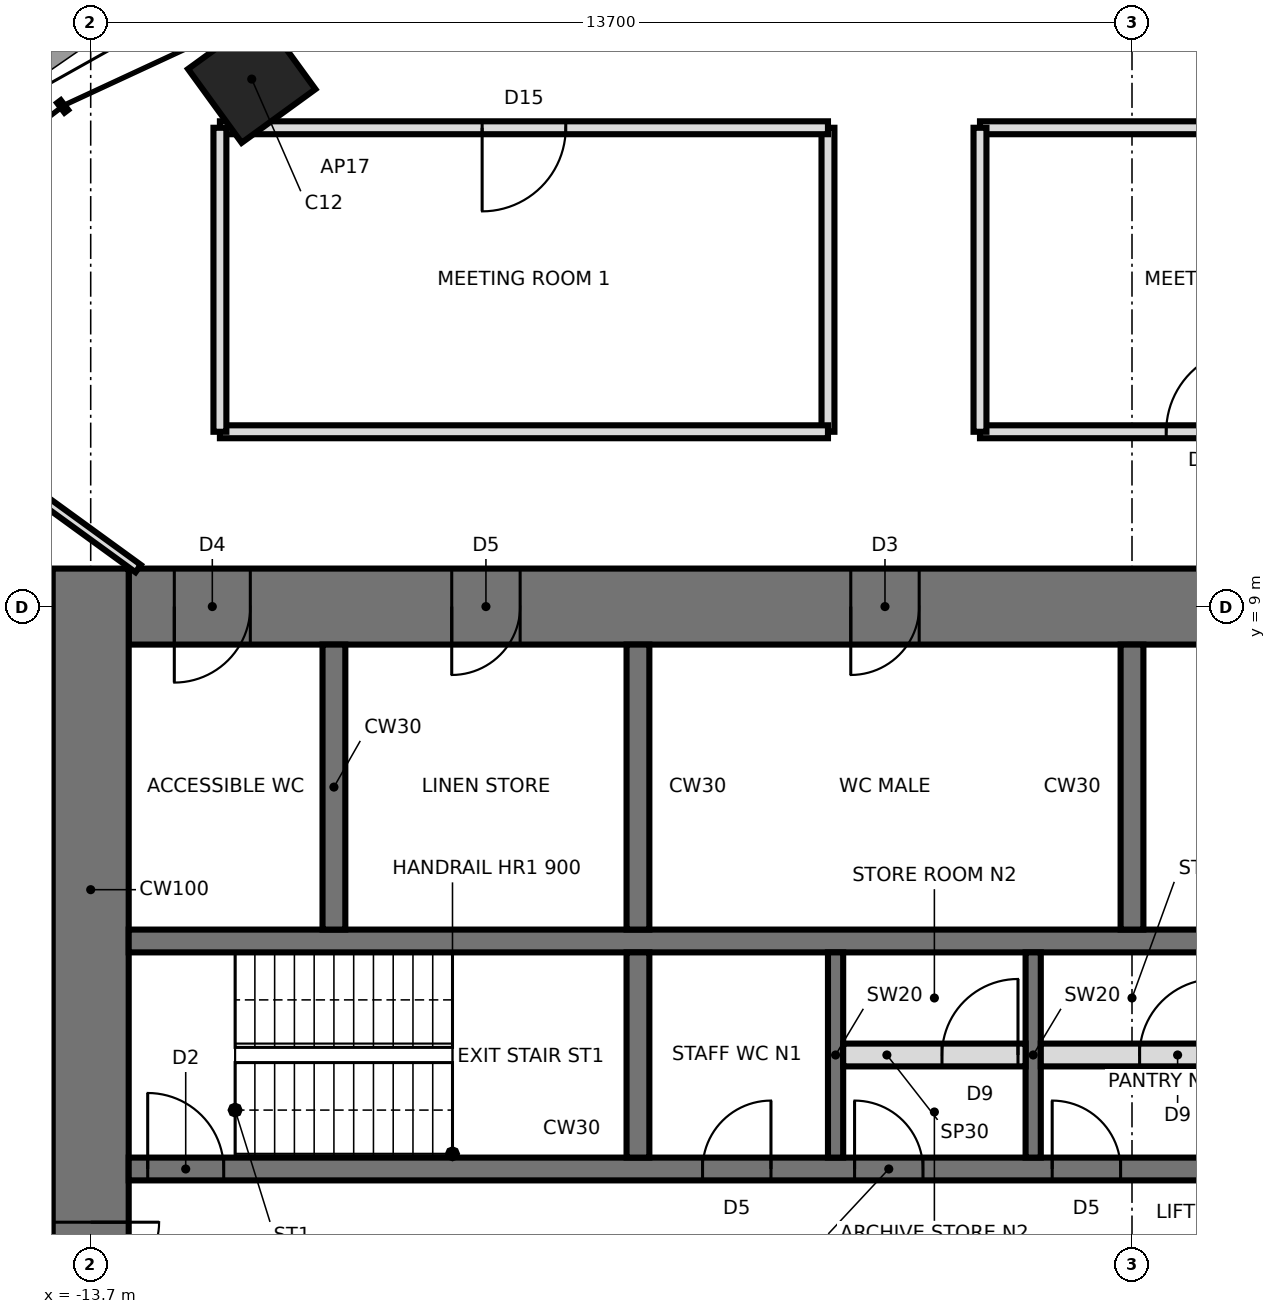
"""IFC4 building model, lengths in metres.
Left out: names, types, materials, properties, quantities, classifications, styles, units other than length and angle.
Written with IfcOpenShell. Run it as: python <this file> out.ifc"""

import sys

from ifc_helpers import new_model, si_unit, direction, frame, frame_2d, origin, origin_2d, place, context, subcontext, project, spatial, rectangle, extrude, element, fill, save


model = new_model("IFC4")
c1 = context("Model", 3, precision=1e-05, world=origin(), true_north=direction((0.0, 1.0)))
c2 = subcontext(c1, "Body", "Model", "MODEL_VIEW")
j1 = project(units=[si_unit("LENGTHUNIT", "METRE"), si_unit("PLANEANGLEUNIT", "RADIAN")], contexts=[c1])
p1 = place(None, origin())
s1 = spatial("IfcSite", under=j1, at=p1, CompositionType="ELEMENT")
p2 = place(p1, origin())
s2 = spatial("IfcBuilding", under=s1, at=p2, CompositionType="ELEMENT")
p3 = place(p2, frame((0.0, 0.0, 264.4)))
s3 = spatial("IfcBuildingStorey", under=s2, at=p3, CompositionType="ELEMENT", Elevation=264.4)
p4 = place(p3, frame((-11.581, 15.94, 0.0), z_axis=(0.0, 0.0, 1.0), x_axis=(-0.587785252292, 0.809016994375, 0.0)))
e1 = element("IfcColumn", 1, at=p4, inside=s3, PredefinedType="COLUMN", context=c2, shape_type="SweptSolid", body=[
    extrude(rectangle(XDim=1.2, YDim=1.2, at=origin_2d()), origin(), (0.0, 0.0, 1.0), 4.2),
])
p5 = place(p3, frame((13.2, 9.0, 0.0), z_axis=(0.0, 0.0, 1.0), x_axis=(-1.0, 0.0, 0.0)))
e2 = element("IfcWall", 2, at=p5, inside=s3, PredefinedType="SHEAR", context=c2, shape_type="SweptSolid", body=[
    extrude(rectangle(XDim=26.4, YDim=1.0, at=frame_2d((13.2, 0.0))), origin(), (0.0, 0.0, 1.0), 4.2),
])
p6 = place(p5, frame((2.65, 0.0, 0.0)))
e3 = element("IfcOpeningElement", 3, at=p6, cuts=e2, PredefinedType="OPENING", context=c2, shape_type="SweptSolid", body=[
    extrude(rectangle(XDim=0.9, YDim=2.1, at=frame_2d((0.45, 1.05))), frame((0.0, 0.51, 0.0), z_axis=(0.0, -1.0, 0.0), x_axis=(1.0, 0.0, 0.0)), (0.0, 0.0, 1.0), 1.02),
])
p7 = place(p5, frame((9.5, 0.0, 0.0)))
e4 = element("IfcOpeningElement", 4, at=p7, cuts=e2, PredefinedType="OPENING", context=c2, shape_type="SweptSolid", body=[
    extrude(rectangle(XDim=0.9, YDim=2.1, at=frame_2d((0.45, 1.05))), frame((0.0, 0.51, 0.0), z_axis=(0.0, -1.0, 0.0), x_axis=(1.0, 0.0, 0.0)), (0.0, 0.0, 1.0), 1.02),
])
p8 = place(p5, frame((16.0, 0.0, 0.0)))
e5 = element("IfcOpeningElement", 5, at=p8, cuts=e2, PredefinedType="OPENING", context=c2, shape_type="SweptSolid", body=[
    extrude(rectangle(XDim=0.9, YDim=2.1, at=frame_2d((0.45, 1.05))), frame((0.0, 0.51, 0.0), z_axis=(0.0, -1.0, 0.0), x_axis=(1.0, 0.0, 0.0)), (0.0, 0.0, 1.0), 1.02),
])
p9 = place(p5, frame((21.25, 0.0, 0.0)))
e6 = element("IfcOpeningElement", 6, at=p9, cuts=e2, PredefinedType="OPENING", context=c2, shape_type="SweptSolid", body=[
    extrude(rectangle(XDim=0.9, YDim=2.1, at=frame_2d((0.45, 1.05))), frame((0.0, 0.51, 0.0), z_axis=(0.0, -1.0, 0.0), x_axis=(1.0, 0.0, 0.0)), (0.0, 0.0, 1.0), 1.02),
])
p10 = place(p5, frame((24.8, 0.0, 0.0)))
e7 = element("IfcOpeningElement", 7, at=p10, cuts=e2, PredefinedType="OPENING", context=c2, shape_type="SweptSolid", body=[
    extrude(rectangle(XDim=1.0, YDim=2.1, at=frame_2d((0.5, 1.05))), frame((0.0, 0.51, 0.0), z_axis=(0.0, -1.0, 0.0), x_axis=(1.0, 0.0, 0.0)), (0.0, 0.0, 1.0), 1.02),
])
p11 = place(p3, frame((-13.7, 9.5, 0.0), z_axis=(0.0, 0.0, 1.0), x_axis=(0.0, -1.0, 0.0)))
e8 = element("IfcWall", 8, at=p11, inside=s3, PredefinedType="SHEAR", context=c2, shape_type="SweptSolid", body=[
    extrude(rectangle(XDim=19.0, YDim=1.0, at=frame_2d((9.5, 0.0))), origin(), (0.0, 0.0, 1.0), 4.2),
])
p12 = place(p11, frame((8.6, 0.0, 0.0)))
e9 = element("IfcOpeningElement", 9, at=p12, cuts=e8, PredefinedType="OPENING", context=c2, shape_type="SweptSolid", body=[
    extrude(rectangle(XDim=1.8, YDim=2.4, at=frame_2d((0.9, 1.2))), frame((0.0, 0.51, 0.0), z_axis=(0.0, -1.0, 0.0), x_axis=(1.0, 0.0, 0.0)), (0.0, 0.0, 1.0), 1.02),
])
p13 = place(p3, frame((-13.2, 1.6, 0.0), z_axis=(0.0, 0.0, 1.0), x_axis=(1.0, 0.0, 0.0)))
e10 = element("IfcWall", 10, at=p13, inside=s3, PredefinedType="SHEAR", context=c2, shape_type="SweptSolid", body=[
    extrude(rectangle(XDim=26.4, YDim=0.3, at=frame_2d((13.2, 0.0))), origin(), (0.0, 0.0, 1.0), 4.2),
])
p14 = place(p13, frame((0.25, 0.0, 0.0)))
e11 = element("IfcOpeningElement", 11, at=p14, cuts=e10, PredefinedType="OPENING", context=c2, shape_type="SweptSolid", body=[
    extrude(rectangle(XDim=1.0, YDim=2.1, at=frame_2d((0.5, 1.05))), frame((0.0, 0.16, 0.0), z_axis=(0.0, -1.0, 0.0), x_axis=(1.0, 0.0, 0.0)), (0.0, 0.0, 1.0), 0.32),
])
p15 = place(p13, frame((20.25, 0.0, 0.0)))
e12 = element("IfcOpeningElement", 12, at=p15, cuts=e10, PredefinedType="OPENING", context=c2, shape_type="SweptSolid", body=[
    extrude(rectangle(XDim=1.5, YDim=2.4, at=frame_2d((0.75, 1.2))), frame((0.0, 0.16, 0.0), z_axis=(0.0, -1.0, 0.0), x_axis=(1.0, 0.0, 0.0)), (0.0, 0.0, 1.0), 0.32),
])
p16 = place(p13, frame((7.55, 0.0, 0.0)))
e13 = element("IfcOpeningElement", 13, at=p16, cuts=e10, PredefinedType="OPENING", context=c2, shape_type="SweptSolid", body=[
    extrude(rectangle(XDim=0.9, YDim=2.1, at=frame_2d((0.45, 1.05))), frame((0.0, 0.16, 0.0), z_axis=(0.0, -1.0, 0.0), x_axis=(1.0, 0.0, 0.0)), (0.0, 0.0, 1.0), 0.32),
])
p17 = place(p13, frame((9.55, 0.0, 0.0)))
e14 = element("IfcOpeningElement", 14, at=p17, cuts=e10, PredefinedType="OPENING", context=c2, shape_type="SweptSolid", body=[
    extrude(rectangle(XDim=0.9, YDim=2.1, at=frame_2d((0.45, 1.05))), frame((0.0, 0.16, 0.0), z_axis=(0.0, -1.0, 0.0), x_axis=(1.0, 0.0, 0.0)), (0.0, 0.0, 1.0), 0.32),
])
p18 = place(p13, frame((12.15, 0.0, 0.0)))
e15 = element("IfcOpeningElement", 15, at=p18, cuts=e10, PredefinedType="OPENING", context=c2, shape_type="SweptSolid", body=[
    extrude(rectangle(XDim=0.9, YDim=2.1, at=frame_2d((0.45, 1.05))), frame((0.0, 0.16, 0.0), z_axis=(0.0, -1.0, 0.0), x_axis=(1.0, 0.0, 0.0)), (0.0, 0.0, 1.0), 0.32),
])
p19 = place(p13, frame((15.25, 0.0, 0.0)))
e16 = element("IfcOpeningElement", 16, at=p19, cuts=e10, PredefinedType="OPENING", context=c2, shape_type="SweptSolid", body=[
    extrude(rectangle(XDim=1.1, YDim=2.3, at=frame_2d((0.55, 1.15))), frame((0.0, 0.16, 0.0), z_axis=(0.0, -1.0, 0.0), x_axis=(1.0, 0.0, 0.0)), (0.0, 0.0, 1.0), 0.32),
])
p20 = place(p13, frame((17.85, 0.0, 0.0)))
e17 = element("IfcOpeningElement", 17, at=p20, cuts=e10, PredefinedType="OPENING", context=c2, shape_type="SweptSolid", body=[
    extrude(rectangle(XDim=1.1, YDim=2.3, at=frame_2d((0.55, 1.15))), frame((0.0, 0.16, 0.0), z_axis=(0.0, -1.0, 0.0), x_axis=(1.0, 0.0, 0.0)), (0.0, 0.0, 1.0), 0.32),
])
p21 = place(p13, frame((24.15, 0.0, 0.0)))
e18 = element("IfcOpeningElement", 18, at=p21, cuts=e10, PredefinedType="OPENING", context=c2, shape_type="SweptSolid", body=[
    extrude(rectangle(XDim=0.9, YDim=2.1, at=frame_2d((0.45, 1.05))), frame((0.0, 0.16, 0.0), z_axis=(0.0, -1.0, 0.0), x_axis=(1.0, 0.0, 0.0)), (0.0, 0.0, 1.0), 0.32),
])
p22 = place(p3, frame((-13.2, 4.6, 0.0), z_axis=(0.0, 0.0, 1.0), x_axis=(1.0, 0.0, 0.0)))
e19 = element("IfcWall", 19, at=p22, inside=s3, PredefinedType="SHEAR", context=c2, shape_type="SweptSolid", body=[
    extrude(rectangle(XDim=26.4, YDim=0.3, at=frame_2d((13.2, 0.0))), origin(), (0.0, 0.0, 1.0), 4.2),
])
p23 = place(p3, frame((-6.5, 1.75, 0.0), z_axis=(0.0, 0.0, 1.0), x_axis=(0.0, 1.0, 0.0)))
e20 = element("IfcWall", 20, at=p23, inside=s3, PredefinedType="SHEAR", context=c2, shape_type="SweptSolid", body=[
    extrude(rectangle(XDim=2.7, YDim=0.3, at=frame_2d((1.35, 0.0))), origin(), (0.0, 0.0, 1.0), 4.2),
])
p24 = place(p3, frame((-6.5, 4.75, 0.0), z_axis=(0.0, 0.0, 1.0), x_axis=(0.0, 1.0, 0.0)))
e21 = element("IfcWall", 21, at=p24, inside=s3, PredefinedType="SHEAR", context=c2, shape_type="SweptSolid", body=[
    extrude(rectangle(XDim=3.75, YDim=0.3, at=frame_2d((1.875, 0.0))), origin(), (0.0, 0.0, 1.0), 4.2),
])
for number, where, z_axis, x_axis in (
    (22, (-3.9, 1.75, 0.0), (0.0, 0.0, 1.0), (0.0, 1.0, 0.0)),
    (23, (-1.3, 1.75, 0.0), (0.0, 0.0, 1.0), (0.0, 1.0, 0.0)),
):
    element("IfcWall", number, at=place(p3, frame(where, z_axis=z_axis, x_axis=x_axis)), inside=s3, PredefinedType="SHEAR", context=c2, shape_type="SweptSolid", body=[
        extrude(rectangle(XDim=2.7, YDim=0.2, at=frame_2d((1.35, 0.0))), origin(), (0.0, 0.0, 1.0), 4.2),
    ])
for number, where, z_axis, x_axis in (
    (24, (0.0, 4.75, 0.0), (0.0, 0.0, 1.0), (0.0, 1.0, 0.0)),
    (25, (-10.5, 4.75, 0.0), (0.0, 0.0, 1.0), (0.0, 1.0, 0.0)),
):
    element("IfcWall", number, at=place(p3, frame(where, z_axis=z_axis, x_axis=x_axis)), inside=s3, PredefinedType="SHEAR", context=c2, shape_type="SweptSolid", body=[
        extrude(rectangle(XDim=3.75, YDim=0.3, at=frame_2d((1.875, 0.0))), origin(), (0.0, 0.0, 1.0), 4.2),
    ])
p25 = place(p3, frame((-3.8, 3.1, 0.0), z_axis=(0.0, 0.0, 1.0), x_axis=(1.0, 0.0, 0.0)))
e26 = element("IfcWall", 26, at=p25, inside=s3, PredefinedType="PARTITIONING", context=c2, shape_type="SweptSolid", body=[
    extrude(rectangle(XDim=2.4, YDim=0.3, at=frame_2d((1.2, 0.0))), origin(), (0.0, 0.0, 1.0), 4.04),
])
p26 = place(p25, frame((1.3, 0.0, 0.0)))
e27 = element("IfcOpeningElement", 27, at=p26, cuts=e26, PredefinedType="OPENING", context=c2, shape_type="SweptSolid", body=[
    extrude(rectangle(XDim=1.0, YDim=2.4, at=frame_2d((0.5, 1.2))), frame((0.0, 0.16, 0.0), z_axis=(0.0, -1.0, 0.0), x_axis=(1.0, 0.0, 0.0)), (0.0, 0.0, 1.0), 0.32),
])
p27 = place(p3, frame((-1.2, 3.1, 0.0), z_axis=(0.0, 0.0, 1.0), x_axis=(1.0, 0.0, 0.0)))
e28 = element("IfcWall", 28, at=p27, inside=s3, PredefinedType="PARTITIONING", context=c2, shape_type="SweptSolid", body=[
    extrude(rectangle(XDim=2.4, YDim=0.3, at=frame_2d((1.2, 0.0))), origin(), (0.0, 0.0, 1.0), 4.04),
])
p28 = place(p27, frame((1.3, 0.0, 0.0)))
e29 = element("IfcOpeningElement", 29, at=p28, cuts=e28, PredefinedType="OPENING", context=c2, shape_type="SweptSolid", body=[
    extrude(rectangle(XDim=1.0, YDim=2.4, at=frame_2d((0.5, 1.2))), frame((0.0, 0.16, 0.0), z_axis=(0.0, -1.0, 0.0), x_axis=(1.0, 0.0, 0.0)), (0.0, 0.0, 1.0), 0.32),
])
p29 = place(p3, frame((4.0, 11.3, 0.0), z_axis=(0.0, 0.0, 1.0), x_axis=(-1.0, 0.0, 0.0)))
e30 = element("IfcWall", 30, at=p29, inside=s3, PredefinedType="PARTITIONING", context=c2, shape_type="SweptSolid", body=[
    extrude(rectangle(XDim=6.0, YDim=0.17, at=frame_2d((3.0, 0.0))), origin(), (0.0, 0.0, 1.0), 4.04),
])
p30 = place(p29, frame((2.45, 0.0, 0.0)))
e31 = element("IfcOpeningElement", 31, at=p30, cuts=e30, PredefinedType="OPENING", context=c2, shape_type="SweptSolid", body=[
    extrude(rectangle(XDim=1.1, YDim=2.4, at=frame_2d((0.55, 1.2))), frame((0.0, 0.095, 0.0), z_axis=(0.0, -1.0, 0.0), x_axis=(1.0, 0.0, 0.0)), (0.0, 0.0, 1.0), 0.19),
])
p31 = place(p3, frame((-2.0, 15.3, 0.0), z_axis=(0.0, 0.0, 1.0), x_axis=(1.0, 0.0, 0.0)))
e32 = element("IfcWall", 32, at=p31, inside=s3, PredefinedType="PARTITIONING", context=c2, shape_type="SweptSolid", body=[
    extrude(rectangle(XDim=6.0, YDim=0.17, at=frame_2d((3.0, 0.0))), origin(), (0.0, 0.0, 1.0), 3.637),
])
for number, where, z_axis, x_axis in (
    (33, (-2.0, 11.3, 0.0), (0.0, 0.0, 1.0), (0.0, 1.0, 0.0)),
    (34, (-4.0, 15.3, 0.0), (0.0, 0.0, 1.0), (0.0, -1.0, 0.0)),
):
    element("IfcWall", number, at=place(p3, frame(where, z_axis=z_axis, x_axis=x_axis)), inside=s3, PredefinedType="PARTITIONING", context=c2, shape_type="SweptSolid", body=[
        extrude(rectangle(XDim=4.0, YDim=0.17, at=frame_2d((2.0, 0.0))), origin(), (0.0, 0.0, 1.0), 4.04),
    ])
p32 = place(p3, frame((-12.0, 15.3, 0.0), z_axis=(0.0, 0.0, 1.0), x_axis=(1.0, 0.0, 0.0)))
e35 = element("IfcWall", 35, at=p32, inside=s3, PredefinedType="PARTITIONING", context=c2, shape_type="SweptSolid", body=[
    extrude(rectangle(XDim=8.0, YDim=0.17, at=frame_2d((4.0, 0.0))), origin(), (0.0, 0.0, 1.0), 4.04),
])
p33 = place(p32, frame((3.45, 0.0, 0.0)))
e36 = element("IfcOpeningElement", 36, at=p33, cuts=e35, PredefinedType="OPENING", context=c2, shape_type="SweptSolid", body=[
    extrude(rectangle(XDim=1.1, YDim=2.4, at=frame_2d((0.55, 1.2))), frame((0.0, 0.095, 0.0), z_axis=(0.0, -1.0, 0.0), x_axis=(1.0, 0.0, 0.0)), (0.0, 0.0, 1.0), 0.19),
])
p34 = place(p3, frame((-4.0, 11.3, 0.0), z_axis=(0.0, 0.0, 1.0), x_axis=(-1.0, 0.0, 0.0)))
e37 = element("IfcWall", 37, at=p34, inside=s3, PredefinedType="PARTITIONING", context=c2, shape_type="SweptSolid", body=[
    extrude(rectangle(XDim=8.0, YDim=0.17, at=frame_2d((4.0, 0.0))), origin(), (0.0, 0.0, 1.0), 4.04),
])
p35 = place(p3, frame((-12.0, 11.3, 0.0), z_axis=(0.0, 0.0, 1.0), x_axis=(0.0, 1.0, 0.0)))
e38 = element("IfcWall", 38, at=p35, inside=s3, PredefinedType="PARTITIONING", context=c2, shape_type="SweptSolid", body=[
    extrude(rectangle(XDim=4.0, YDim=0.17, at=frame_2d((2.0, 0.0))), origin(), (0.0, 0.0, 1.0), 4.04),
])
p36 = place(p3, frame((-13.076, 9.5, 0.0), z_axis=(0.0, 0.0, 1.0), x_axis=(-0.809011091578, 0.58779337671, 0.0)))
e39 = element("IfcWall", 39, at=p36, inside=s3, PredefinedType="PARTITIONING", context=c2, shape_type="SweptSolid", body=[
    extrude(rectangle(XDim=5.603, YDim=0.12, at=frame_2d((2.802, 0.0))), origin(), (0.0, 0.0, 1.0), 3.24),
])
p37 = place(p12, origin())
e40 = element("IfcDoor", 40, at=p37, inside=s3, OperationType="DOUBLE_DOOR_SINGLE_SWING", PredefinedType="DOOR", context=c2, shape_type="SweptSolid", body=[
    extrude(rectangle(XDim=1.72, YDim=2.36, at=frame_2d((0.9, 1.18))), frame((0.0, 0.025, 0.0), z_axis=(0.0, -1.0, 0.0), x_axis=(1.0, 0.0, 0.0)), (0.0, 0.0, 1.0), 0.05),
    extrude(rectangle(XDim=0.04, YDim=2.4, at=frame_2d((0.02, 1.2))), frame((0.0, 0.25, 0.0), z_axis=(0.0, -1.0, 0.0), x_axis=(1.0, 0.0, 0.0)), (0.0, 0.0, 1.0), 0.5),
    extrude(rectangle(XDim=0.04, YDim=2.4, at=frame_2d((1.78, 1.2))), frame((0.0, 0.25, 0.0), z_axis=(0.0, -1.0, 0.0), x_axis=(1.0, 0.0, 0.0)), (0.0, 0.0, 1.0), 0.5),
    extrude(rectangle(XDim=1.72, YDim=0.04, at=frame_2d((0.9, 2.38))), frame((0.0, 0.25, 0.0), z_axis=(0.0, -1.0, 0.0), x_axis=(1.0, 0.0, 0.0)), (0.0, 0.0, 1.0), 0.5),
])
fill(e9, e40)
p38 = place(p14, origin())
e41 = element("IfcDoor", 41, at=p38, inside=s3, OperationType="SINGLE_SWING_LEFT", PredefinedType="DOOR", context=c2, shape_type="SweptSolid", body=[
    extrude(rectangle(XDim=1.0, YDim=2.1, at=frame_2d((0.5, 1.05))), frame((0.0, 0.025, 0.0), z_axis=(0.0, -1.0, 0.0), x_axis=(1.0, 0.0, 0.0)), (0.0, 0.0, 1.0), 0.05),
])
fill(e11, e41)
p39 = place(p16, origin())
e42 = element("IfcDoor", 42, at=p39, inside=s3, OperationType="SINGLE_SWING_RIGHT", PredefinedType="DOOR", context=c2, shape_type="SweptSolid", body=[
    extrude(rectangle(XDim=0.9, YDim=2.1, at=frame_2d((0.45, 1.05))), frame((0.0, 0.025, 0.0), z_axis=(0.0, -1.0, 0.0), x_axis=(1.0, 0.0, 0.0)), (0.0, 0.0, 1.0), 0.05),
])
fill(e13, e42)
p40 = place(p26, origin())
e43 = element("IfcDoor", 43, at=p40, inside=s3, OperationType="SINGLE_SWING_RIGHT", PredefinedType="DOOR", context=c2, shape_type="SweptSolid", body=[
    extrude(rectangle(XDim=1.0, YDim=2.4, at=frame_2d((0.5, 1.2))), frame((0.0, 0.025, 0.0), z_axis=(0.0, -1.0, 0.0), x_axis=(1.0, 0.0, 0.0)), (0.0, 0.0, 1.0), 0.05),
])
fill(e27, e43)
p41 = place(p17, origin())
e44 = element("IfcDoor", 44, at=p41, inside=s3, OperationType="SINGLE_SWING_LEFT", PredefinedType="DOOR", context=c2, shape_type="SweptSolid", body=[
    extrude(rectangle(XDim=0.9, YDim=2.1, at=frame_2d((0.45, 1.05))), frame((0.0, 0.025, 0.0), z_axis=(0.0, -1.0, 0.0), x_axis=(1.0, 0.0, 0.0)), (0.0, 0.0, 1.0), 0.05),
])
fill(e14, e44)
p42 = place(p28, origin())
e45 = element("IfcDoor", 45, at=p42, inside=s3, OperationType="SINGLE_SWING_RIGHT", PredefinedType="DOOR", context=c2, shape_type="SweptSolid", body=[
    extrude(rectangle(XDim=1.0, YDim=2.4, at=frame_2d((0.5, 1.2))), frame((0.0, 0.025, 0.0), z_axis=(0.0, -1.0, 0.0), x_axis=(1.0, 0.0, 0.0)), (0.0, 0.0, 1.0), 0.05),
])
fill(e29, e45)
p43 = place(p18, origin())
e46 = element("IfcDoor", 46, at=p43, inside=s3, OperationType="SINGLE_SWING_LEFT", PredefinedType="DOOR", context=c2, shape_type="SweptSolid", body=[
    extrude(rectangle(XDim=0.9, YDim=2.1, at=frame_2d((0.45, 1.05))), frame((0.0, 0.025, 0.0), z_axis=(0.0, -1.0, 0.0), x_axis=(1.0, 0.0, 0.0)), (0.0, 0.0, 1.0), 0.05),
])
fill(e15, e46)
p44 = place(p8, origin())
e47 = element("IfcDoor", 47, at=p44, inside=s3, OperationType="SINGLE_SWING_RIGHT", PredefinedType="DOOR", context=c2, shape_type="SweptSolid", body=[
    extrude(rectangle(XDim=0.82, YDim=2.06, at=frame_2d((0.45, 1.03))), frame((0.0, 0.025, 0.0), z_axis=(0.0, -1.0, 0.0), x_axis=(1.0, 0.0, 0.0)), (0.0, 0.0, 1.0), 0.05),
    extrude(rectangle(XDim=0.04, YDim=2.1, at=frame_2d((0.02, 1.05))), frame((0.0, 0.25, 0.0), z_axis=(0.0, -1.0, 0.0), x_axis=(1.0, 0.0, 0.0)), (0.0, 0.0, 1.0), 0.5),
    extrude(rectangle(XDim=0.04, YDim=2.1, at=frame_2d((0.88, 1.05))), frame((0.0, 0.25, 0.0), z_axis=(0.0, -1.0, 0.0), x_axis=(1.0, 0.0, 0.0)), (0.0, 0.0, 1.0), 0.5),
    extrude(rectangle(XDim=0.82, YDim=0.04, at=frame_2d((0.45, 2.08))), frame((0.0, 0.25, 0.0), z_axis=(0.0, -1.0, 0.0), x_axis=(1.0, 0.0, 0.0)), (0.0, 0.0, 1.0), 0.5),
])
fill(e5, e47)
p45 = place(p9, origin())
e48 = element("IfcDoor", 48, at=p45, inside=s3, OperationType="SINGLE_SWING_RIGHT", PredefinedType="DOOR", context=c2, shape_type="SweptSolid", body=[
    extrude(rectangle(XDim=0.82, YDim=2.06, at=frame_2d((0.45, 1.03))), frame((0.0, 0.025, 0.0), z_axis=(0.0, -1.0, 0.0), x_axis=(1.0, 0.0, 0.0)), (0.0, 0.0, 1.0), 0.05),
    extrude(rectangle(XDim=0.04, YDim=2.1, at=frame_2d((0.02, 1.05))), frame((0.0, 0.25, 0.0), z_axis=(0.0, -1.0, 0.0), x_axis=(1.0, 0.0, 0.0)), (0.0, 0.0, 1.0), 0.5),
    extrude(rectangle(XDim=0.04, YDim=2.1, at=frame_2d((0.88, 1.05))), frame((0.0, 0.25, 0.0), z_axis=(0.0, -1.0, 0.0), x_axis=(1.0, 0.0, 0.0)), (0.0, 0.0, 1.0), 0.5),
    extrude(rectangle(XDim=0.82, YDim=0.04, at=frame_2d((0.45, 2.08))), frame((0.0, 0.25, 0.0), z_axis=(0.0, -1.0, 0.0), x_axis=(1.0, 0.0, 0.0)), (0.0, 0.0, 1.0), 0.5),
])
fill(e6, e48)
p46 = place(p10, origin())
e49 = element("IfcDoor", 49, at=p46, inside=s3, OperationType="SINGLE_SWING_RIGHT", PredefinedType="DOOR", context=c2, shape_type="SweptSolid", body=[
    extrude(rectangle(XDim=0.92, YDim=2.06, at=frame_2d((0.5, 1.03))), frame((0.0, 0.025, 0.0), z_axis=(0.0, -1.0, 0.0), x_axis=(1.0, 0.0, 0.0)), (0.0, 0.0, 1.0), 0.05),
    extrude(rectangle(XDim=0.04, YDim=2.1, at=frame_2d((0.02, 1.05))), frame((0.0, 0.25, 0.0), z_axis=(0.0, -1.0, 0.0), x_axis=(1.0, 0.0, 0.0)), (0.0, 0.0, 1.0), 0.5),
    extrude(rectangle(XDim=0.04, YDim=2.1, at=frame_2d((0.98, 1.05))), frame((0.0, 0.25, 0.0), z_axis=(0.0, -1.0, 0.0), x_axis=(1.0, 0.0, 0.0)), (0.0, 0.0, 1.0), 0.5),
    extrude(rectangle(XDim=0.92, YDim=0.04, at=frame_2d((0.5, 2.08))), frame((0.0, 0.25, 0.0), z_axis=(0.0, -1.0, 0.0), x_axis=(1.0, 0.0, 0.0)), (0.0, 0.0, 1.0), 0.5),
])
fill(e7, e49)
p47 = place(p33, frame((1.1, 0.0, 0.0), z_axis=(0.0, 0.0, 1.0), x_axis=(-1.0, 0.0, 0.0)))
e50 = element("IfcDoor", 50, at=p47, inside=s3, OperationType="SINGLE_SWING_RIGHT", PredefinedType="DOOR", context=c2, shape_type="SweptSolid", body=[
    extrude(rectangle(XDim=1.1, YDim=2.4, at=frame_2d((0.55, 1.2))), frame((0.0, 0.025, 0.0), z_axis=(0.0, -1.0, 0.0), x_axis=(1.0, 0.0, 0.0)), (0.0, 0.0, 1.0), 0.05),
])
fill(e36, e50)
p48 = place(p30, frame((1.1, 0.0, 0.0), z_axis=(0.0, 0.0, 1.0), x_axis=(-1.0, 0.0, 0.0)))
e51 = element("IfcDoor", 51, at=p48, inside=s3, OperationType="SINGLE_SWING_RIGHT", PredefinedType="DOOR", context=c2, shape_type="SweptSolid", body=[
    extrude(rectangle(XDim=1.1, YDim=2.4, at=frame_2d((0.55, 1.2))), frame((0.0, 0.025, 0.0), z_axis=(0.0, -1.0, 0.0), x_axis=(1.0, 0.0, 0.0)), (0.0, 0.0, 1.0), 0.05),
])
fill(e31, e51)
save(model, sys.argv[1])
